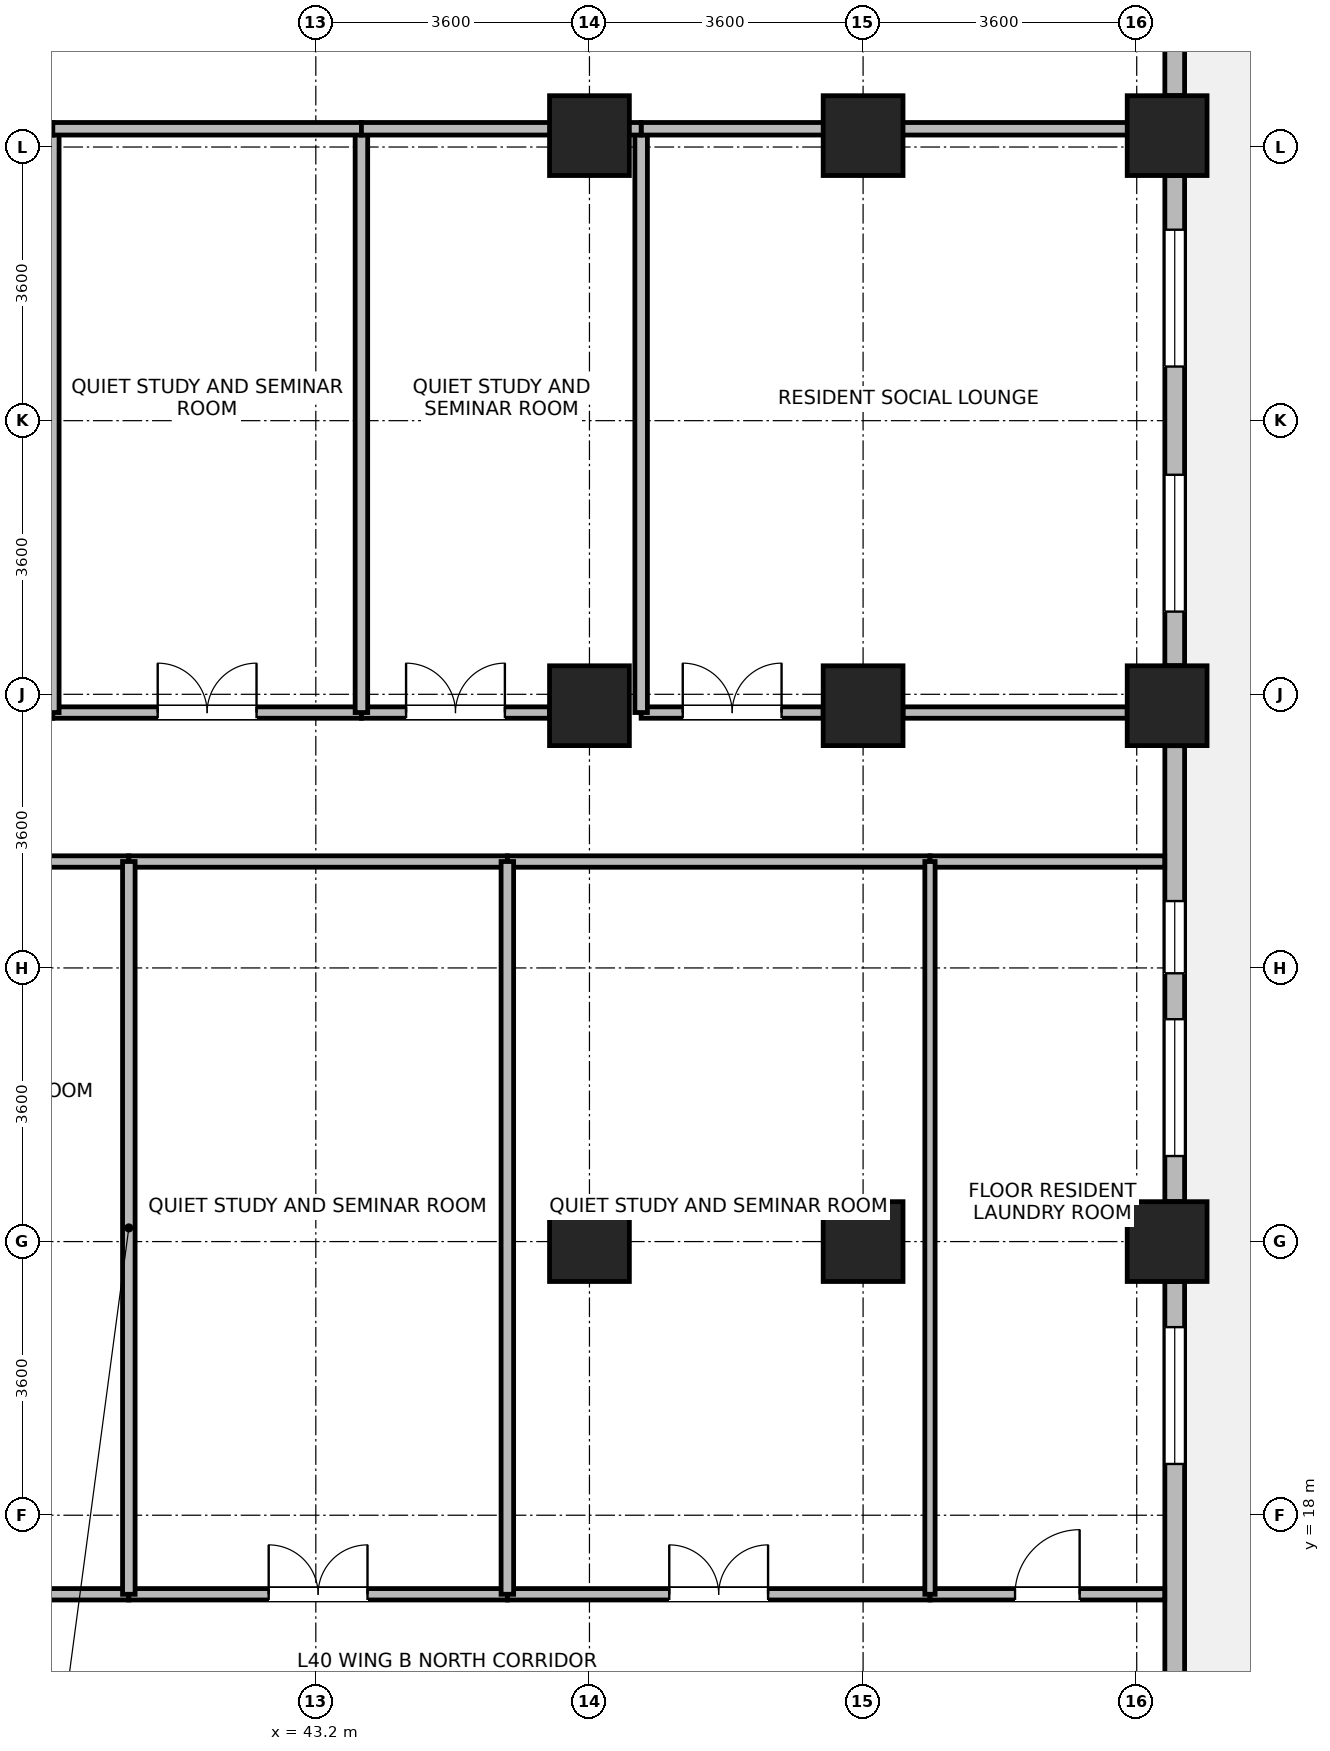
"""IFC4 building model, lengths in metres.
Left out: names, types, materials, properties, quantities, classifications, styles, units other than length and angle.
Written with IfcOpenShell. Run it as: python <this file> out.ifc"""

import sys

from ifc_helpers import new_model, si_unit, direction, frame, frame_2d, origin, origin_2d, place, context, subcontext, project, spatial, rectangle, extrude, source, transform, mapped, element, fill, save


model = new_model("IFC4")
c1 = context("Model", 3, precision=1e-05, world=origin(), true_north=direction((0.0, 1.0)))
c2 = subcontext(c1, "Body", "Model", "MODEL_VIEW")
j1 = project(units=[si_unit("LENGTHUNIT", "METRE"), si_unit("PLANEANGLEUNIT", "RADIAN")], contexts=[c1])
p1 = place(None, origin())
s1 = spatial("IfcSite", under=j1, at=p1, CompositionType="ELEMENT")
p2 = place(p1, origin())
s2 = spatial("IfcBuilding", under=s1, at=p2, CompositionType="ELEMENT")
p3 = place(p2, frame((0.0, 0.0, 158.7)))
s3 = spatial("IfcBuildingStorey", under=s2, at=p3, CompositionType="ELEMENT", Elevation=158.7)
m1 = source(origin(), c2, "Body", "SweptSolid", [
    extrude(rectangle(XDim=1.05, YDim=1.05, at=origin_2d()), origin(), (0.0, 0.0, 1.0), 3.7),
])
for number, where, z_axis, x_axis in (
    (1, (46.8, 21.6, 0.0), (0.0, 0.0, 1.0), (1.0, 0.0, 0.0)),
    (2, (46.8, 28.65, 0.0), (0.0, 0.0, 1.0), (1.0, 0.0, 0.0)),
    (3, (46.8, 36.15, 0.0), (0.0, 0.0, 1.0), (1.0, 0.0, 0.0)),
    (4, (50.4, 21.6, 0.0), (0.0, 0.0, 1.0), (1.0, 0.0, 0.0)),
    (5, (50.4, 28.65, 0.0), (0.0, 0.0, 1.0), (1.0, 0.0, 0.0)),
    (6, (50.4, 36.15, 0.0), (0.0, 0.0, 1.0), (1.0, 0.0, 0.0)),
    (7, (54.4, 21.6, 0.0), (0.0, 0.0, 1.0), (1.0, 0.0, 0.0)),
    (8, (54.4, 28.65, 0.0), (0.0, 0.0, 1.0), (1.0, 0.0, 0.0)),
    (9, (54.4, 36.15, 0.0), (0.0, 0.0, 1.0), (1.0, 0.0, 0.0)),
):
    element("IfcColumn", number, at=place(p3, frame(where, z_axis=z_axis, x_axis=x_axis)), inside=s3, PredefinedType="COLUMN", context=c2, shape_type="MappedRepresentation", body=[
        mapped(m1, transform((0.0, 0.0, 0.0), x_axis=(1.0, 0.0, 0.0), y_axis=(0.0, 1.0, 0.0), z_axis=(0.0, 0.0, 1.0), scale=1.0)),
    ])
p4 = place(p3, frame((54.5, 21.074, 0.0), z_axis=(0.0, 0.0, 1.0), x_axis=(0.0, -1.0, 0.0)))
e10 = element("IfcWall", 10, at=p4, inside=s3, PredefinedType="STANDARD", context=c2, shape_type="SweptSolid", body=[
    extrude(rectangle(XDim=5.998, YDim=0.26, at=frame_2d((2.999, 0.0))), origin(), (0.0, 0.0, 1.0), 2.99),
])
p5 = place(p4, frame((0.6, 0.0, 0.85)))
e11 = element("IfcOpeningElement", 11, at=p5, cuts=e10, PredefinedType="OPENING", context=c2, shape_type="SweptSolid", body=[
    extrude(rectangle(XDim=1.8, YDim=1.85, at=frame_2d((0.9, 0.925))), frame((0.0, 0.14, 0.0), z_axis=(0.0, -1.0, 0.0), x_axis=(1.0, 0.0, 0.0)), (0.0, 0.0, 1.0), 0.28),
])
p6 = place(p3, frame((54.5, 28.124, 0.0), z_axis=(0.0, 0.0, 1.0), x_axis=(0.0, -1.0, 0.0)))
e12 = element("IfcWall", 12, at=p6, inside=s3, PredefinedType="STANDARD", context=c2, shape_type="SweptSolid", body=[
    extrude(rectangle(XDim=5.998, YDim=0.26, at=frame_2d((2.999, 0.0))), origin(), (0.0, 0.0, 1.0), 2.99),
])
p7 = place(p6, frame((3.598, 0.0, 0.85)))
e13 = element("IfcOpeningElement", 13, at=p7, cuts=e12, PredefinedType="OPENING", context=c2, shape_type="SweptSolid", body=[
    extrude(rectangle(XDim=1.8, YDim=1.85, at=frame_2d((0.9, 0.925))), frame((0.0, 0.14, 0.0), z_axis=(0.0, -1.0, 0.0), x_axis=(1.0, 0.0, 0.0)), (0.0, 0.0, 1.0), 0.28),
])
p8 = place(p6, frame((2.044, 0.0, 0.85)))
e14 = element("IfcOpeningElement", 14, at=p8, cuts=e12, PredefinedType="OPENING", context=c2, shape_type="SweptSolid", body=[
    extrude(rectangle(XDim=0.95, YDim=1.75, at=frame_2d((0.475, 0.875))), frame((0.0, 0.14, 0.0), z_axis=(0.0, -1.0, 0.0), x_axis=(1.0, 0.0, 0.0)), (0.0, 0.0, 1.0), 0.28),
])
p9 = place(p3, frame((54.5, 35.624, 0.0), z_axis=(0.0, 0.0, 1.0), x_axis=(0.0, -1.0, 0.0)))
e15 = element("IfcWall", 15, at=p9, inside=s3, PredefinedType="STANDARD", context=c2, shape_type="SweptSolid", body=[
    extrude(rectangle(XDim=6.448, YDim=0.26, at=frame_2d((3.224, 0.0))), origin(), (0.0, 0.0, 1.0), 2.99),
])
p10 = place(p9, frame((0.712, 0.0, 0.85)))
e16 = element("IfcOpeningElement", 16, at=p10, cuts=e15, PredefinedType="OPENING", context=c2, shape_type="SweptSolid", body=[
    extrude(rectangle(XDim=1.8, YDim=1.85, at=frame_2d((0.9, 0.925))), frame((0.0, 0.14, 0.0), z_axis=(0.0, -1.0, 0.0), x_axis=(1.0, 0.0, 0.0)), (0.0, 0.0, 1.0), 0.28),
])
p11 = place(p9, frame((3.936, 0.0, 0.85)))
e17 = element("IfcOpeningElement", 17, at=p11, cuts=e15, PredefinedType="OPENING", context=c2, shape_type="SweptSolid", body=[
    extrude(rectangle(XDim=1.8, YDim=1.85, at=frame_2d((0.9, 0.925))), frame((0.0, 0.14, 0.0), z_axis=(0.0, -1.0, 0.0), x_axis=(1.0, 0.0, 0.0)), (0.0, 0.0, 1.0), 0.28),
])
p12 = place(p3, frame((54.5, 43.33, 0.0), z_axis=(0.0, 0.0, 1.0), x_axis=(0.0, -1.0, 0.0)))
e18 = element("IfcWall", 18, at=p12, inside=s3, PredefinedType="STANDARD", context=c2, shape_type="SweptSolid", body=[
    extrude(rectangle(XDim=6.654, YDim=0.26, at=frame_2d((3.327, 0.0))), origin(), (0.0, 0.0, 1.0), 3.44),
])
p13 = place(p12, frame((0.763, 0.0, 0.85)))
e19 = element("IfcOpeningElement", 19, at=p13, cuts=e18, PredefinedType="OPENING", context=c2, shape_type="SweptSolid", body=[
    extrude(rectangle(XDim=1.8, YDim=1.85, at=frame_2d((0.9, 0.925))), frame((0.0, 0.14, 0.0), z_axis=(0.0, -1.0, 0.0), x_axis=(1.0, 0.0, 0.0)), (0.0, 0.0, 1.0), 0.28),
])
p14 = place(p12, frame((4.091, 0.0, 0.85)))
e20 = element("IfcOpeningElement", 20, at=p14, cuts=e18, PredefinedType="OPENING", context=c2, shape_type="SweptSolid", body=[
    extrude(rectangle(XDim=1.8, YDim=1.85, at=frame_2d((0.9, 0.925))), frame((0.0, 0.14, 0.0), z_axis=(0.0, -1.0, 0.0), x_axis=(1.0, 0.0, 0.0)), (0.0, 0.0, 1.0), 0.28),
])
p15 = place(p3, frame((47.48, 28.56, 0.0), z_axis=(0.0, 0.0, 1.0), x_axis=(1.0, 0.0, 0.0)))
e21 = element("IfcWall", 21, at=p15, inside=s3, PredefinedType="PARTITIONING", context=c2, shape_type="SweptSolid", body=[
    extrude(rectangle(XDim=2.395, YDim=0.15, at=frame_2d((1.198, 0.0))), origin(), (0.0, 0.0, 1.0), 2.84),
])
p16 = place(p15, frame((0.548, 0.0, 0.0)))
e22 = element("IfcOpeningElement", 22, at=p16, cuts=e21, PredefinedType="OPENING", context=c2, shape_type="SweptSolid", body=[
    extrude(rectangle(XDim=1.3, YDim=2.12, at=frame_2d((0.65, 1.06))), frame((0.0, 0.085, 0.0), z_axis=(0.0, -1.0, 0.0), x_axis=(1.0, 0.0, 0.0)), (0.0, 0.0, 1.0), 0.17),
])
p17 = place(p3, frame((50.925, 28.56, 0.0), z_axis=(0.0, 0.0, 1.0), x_axis=(1.0, 0.0, 0.0)))
e23 = element("IfcWall", 23, at=p17, inside=s3, PredefinedType="PARTITIONING", context=c2, shape_type="SweptSolid", body=[
    extrude(rectangle(XDim=2.95, YDim=0.15, at=frame_2d((1.475, 0.0))), origin(), (0.0, 0.0, 1.0), 2.84),
])
p18 = place(p3, frame((45.72, 16.96, 0.0), z_axis=(0.0, 0.0, 1.0), x_axis=(1.0, 0.0, 0.0)))
e24 = element("IfcWall", 24, at=p18, inside=s3, PredefinedType="PARTITIONING", context=c2, shape_type="SweptSolid", body=[
    extrude(rectangle(XDim=5.56, YDim=0.15, at=frame_2d((2.78, 0.0))), origin(), (0.0, 0.0, 1.0), 3.44),
])
p19 = place(p18, frame((2.13, 0.0, 0.0)))
e25 = element("IfcOpeningElement", 25, at=p19, cuts=e24, PredefinedType="OPENING", context=c2, shape_type="SweptSolid", body=[
    extrude(rectangle(XDim=1.3, YDim=2.12, at=frame_2d((0.65, 1.06))), frame((0.0, 0.085, 0.0), z_axis=(0.0, -1.0, 0.0), x_axis=(1.0, 0.0, 0.0)), (0.0, 0.0, 1.0), 0.17),
])
p20 = place(p3, frame((45.72, 26.6, 0.0), z_axis=(0.0, 0.0, 1.0), x_axis=(1.0, 0.0, 0.0)))
e26 = element("IfcWall", 26, at=p20, inside=s3, PredefinedType="PARTITIONING", context=c2, shape_type="SweptSolid", body=[
    extrude(rectangle(XDim=5.56, YDim=0.15, at=frame_2d((2.78, 0.0))), origin(), (0.0, 0.0, 1.0), 3.44),
])
for number, where, z_axis, x_axis in (
    (27, (35.36, 16.96, 0.0), (0.0, 0.0, 1.0), (1.0, 0.0, 0.0)),
    (28, (35.36, 26.6, 0.0), (0.0, 0.0, 1.0), (1.0, 0.0, 0.0)),
):
    element("IfcWall", number, at=place(p3, frame(where, z_axis=z_axis, x_axis=x_axis)), inside=s3, PredefinedType="PARTITIONING", context=c2, shape_type="SweptSolid", body=[
        extrude(rectangle(XDim=5.38, YDim=0.15, at=frame_2d((2.69, 0.0))), origin(), (0.0, 0.0, 1.0), 3.44),
    ])
p21 = place(p3, frame((40.74, 16.96, 0.0), z_axis=(0.0, 0.0, 1.0), x_axis=(1.0, 0.0, 0.0)))
e29 = element("IfcWall", 29, at=p21, inside=s3, PredefinedType="PARTITIONING", context=c2, shape_type="SweptSolid", body=[
    extrude(rectangle(XDim=4.98, YDim=0.15, at=frame_2d((2.49, 0.0))), origin(), (0.0, 0.0, 1.0), 3.44),
])
p22 = place(p21, frame((1.84, 0.0, 0.0)))
e30 = element("IfcOpeningElement", 30, at=p22, cuts=e29, PredefinedType="OPENING", context=c2, shape_type="SweptSolid", body=[
    extrude(rectangle(XDim=1.3, YDim=2.12, at=frame_2d((0.65, 1.06))), frame((0.0, 0.085, 0.0), z_axis=(0.0, -1.0, 0.0), x_axis=(1.0, 0.0, 0.0)), (0.0, 0.0, 1.0), 0.17),
])
p23 = place(p3, frame((40.74, 26.6, 0.0), z_axis=(0.0, 0.0, 1.0), x_axis=(1.0, 0.0, 0.0)))
e31 = element("IfcWall", 31, at=p23, inside=s3, PredefinedType="PARTITIONING", context=c2, shape_type="SweptSolid", body=[
    extrude(rectangle(XDim=4.98, YDim=0.15, at=frame_2d((2.49, 0.0))), origin(), (0.0, 0.0, 1.0), 3.44),
])
p24 = place(p3, frame((36.525, 28.56, 0.0), z_axis=(0.0, 0.0, 1.0), x_axis=(1.0, 0.0, 0.0)))
e32 = element("IfcWall", 32, at=p24, inside=s3, PredefinedType="PARTITIONING", context=c2, shape_type="SweptSolid", body=[
    extrude(rectangle(XDim=3.215, YDim=0.15, at=frame_2d((1.607, 0.0))), origin(), (0.0, 0.0, 1.0), 2.84),
])
p25 = place(p3, frame((39.74, 28.56, 0.0), z_axis=(0.0, 0.0, 1.0), x_axis=(1.0, 0.0, 0.0)))
e33 = element("IfcWall", 33, at=p25, inside=s3, PredefinedType="PARTITIONING", context=c2, shape_type="SweptSolid", body=[
    extrude(rectangle(XDim=4.06, YDim=0.15, at=frame_2d((2.03, 0.0))), origin(), (0.0, 0.0, 1.0), 2.84),
])
p26 = place(p25, frame((1.38, 0.0, 0.0)))
e34 = element("IfcOpeningElement", 34, at=p26, cuts=e33, PredefinedType="OPENING", context=c2, shape_type="SweptSolid", body=[
    extrude(rectangle(XDim=1.3, YDim=2.12, at=frame_2d((0.65, 1.06))), frame((0.0, 0.085, 0.0), z_axis=(0.0, -1.0, 0.0), x_axis=(1.0, 0.0, 0.0)), (0.0, 0.0, 1.0), 0.17),
])
p27 = place(p3, frame((43.8, 28.56, 0.0), z_axis=(0.0, 0.0, 1.0), x_axis=(1.0, 0.0, 0.0)))
e35 = element("IfcWall", 35, at=p27, inside=s3, PredefinedType="PARTITIONING", context=c2, shape_type="SweptSolid", body=[
    extrude(rectangle(XDim=2.475, YDim=0.15, at=frame_2d((1.237, 0.0))), origin(), (0.0, 0.0, 1.0), 2.84),
])
p28 = place(p27, frame((0.587, 0.0, 0.0)))
e36 = element("IfcOpeningElement", 36, at=p28, cuts=e35, PredefinedType="OPENING", context=c2, shape_type="SweptSolid", body=[
    extrude(rectangle(XDim=1.3, YDim=2.12, at=frame_2d((0.65, 1.06))), frame((0.0, 0.085, 0.0), z_axis=(0.0, -1.0, 0.0), x_axis=(1.0, 0.0, 0.0)), (0.0, 0.0, 1.0), 0.17),
])
p29 = place(p3, frame((51.28, 16.96, 0.0), z_axis=(0.0, 0.0, 1.0), x_axis=(1.0, 0.0, 0.0)))
e37 = element("IfcWall", 37, at=p29, inside=s3, PredefinedType="PARTITIONING", context=c2, shape_type="SweptSolid", body=[
    extrude(rectangle(XDim=3.088, YDim=0.15, at=frame_2d((1.544, 0.0))), origin(), (0.0, 0.0, 1.0), 3.44),
])
p30 = place(p29, frame((1.119, 0.0, 0.0)))
e38 = element("IfcOpeningElement", 38, at=p30, cuts=e37, PredefinedType="OPENING", context=c2, shape_type="SweptSolid", body=[
    extrude(rectangle(XDim=0.85, YDim=2.04, at=frame_2d((0.425, 1.02))), frame((0.0, 0.085, 0.0), z_axis=(0.0, -1.0, 0.0), x_axis=(1.0, 0.0, 0.0)), (0.0, 0.0, 1.0), 0.17),
])
p31 = place(p3, frame((51.28, 26.6, 0.0), z_axis=(0.0, 0.0, 1.0), x_axis=(1.0, 0.0, 0.0)))
e39 = element("IfcWall", 39, at=p31, inside=s3, PredefinedType="PARTITIONING", context=c2, shape_type="SweptSolid", body=[
    extrude(rectangle(XDim=3.088, YDim=0.15, at=frame_2d((1.544, 0.0))), origin(), (0.0, 0.0, 1.0), 3.44),
])
for number, where, z_axis, x_axis in (
    (40, (40.74, 16.96, 0.0), (0.0, 0.0, 1.0), (0.0, 1.0, 0.0)),
    (41, (45.72, 16.96, 0.0), (0.0, 0.0, 1.0), (0.0, 1.0, 0.0)),
):
    element("IfcWall", number, at=place(p3, frame(where, z_axis=z_axis, x_axis=x_axis)), inside=s3, PredefinedType="PARTITIONING", context=c2, shape_type="SweptSolid", body=[
        extrude(rectangle(XDim=9.64, YDim=0.165, at=frame_2d((4.82, 0.0))), origin(), (0.0, 0.0, 1.0), 3.44),
    ])
p32 = place(p3, frame((51.28, 16.96, 0.0), z_axis=(0.0, 0.0, 1.0), x_axis=(0.0, 1.0, 0.0)))
e42 = element("IfcWall", 42, at=p32, inside=s3, PredefinedType="PARTITIONING", context=c2, shape_type="SweptSolid", body=[
    extrude(rectangle(XDim=9.64, YDim=0.135, at=frame_2d((4.82, 0.0))), origin(), (0.0, 0.0, 1.0), 3.44),
])
for number, where, z_axis, x_axis in (
    (43, (39.74, 28.56, 0.0), (0.0, 0.0, 1.0), (0.0, 1.0, 0.0)),
    (44, (43.8, 28.56, 0.0), (0.0, 0.0, 1.0), (0.0, 1.0, 0.0)),
    (45, (47.48, 28.56, 0.0), (0.0, 0.0, 1.0), (0.0, 1.0, 0.0)),
):
    element("IfcWall", number, at=place(p3, frame(where, z_axis=z_axis, x_axis=x_axis)), inside=s3, PredefinedType="PARTITIONING", context=c2, shape_type="SweptSolid", body=[
        extrude(rectangle(XDim=7.68, YDim=0.165, at=frame_2d((3.84, 0.0))), origin(), (0.0, 0.0, 1.0), 3.44),
    ])
p33 = place(p3, frame((47.48, 36.24, 0.0), z_axis=(0.0, 0.0, 1.0), x_axis=(1.0, 0.0, 0.0)))
e46 = element("IfcWall", 46, at=p33, inside=s3, PredefinedType="PARTITIONING", context=c2, shape_type="SweptSolid", body=[
    extrude(rectangle(XDim=6.888, YDim=0.165, at=frame_2d((3.444, 0.0))), origin(), (0.0, 0.0, 1.0), 2.84),
])
p34 = place(p3, frame((35.36, 36.24, 0.0), z_axis=(0.0, 0.0, 1.0), x_axis=(1.0, 0.0, 0.0)))
e47 = element("IfcWall", 47, at=p34, inside=s3, PredefinedType="PARTITIONING", context=c2, shape_type="SweptSolid", body=[
    extrude(rectangle(XDim=4.38, YDim=0.165, at=frame_2d((2.19, 0.0))), origin(), (0.0, 0.0, 1.0), 2.84),
])
p35 = place(p3, frame((39.74, 36.24, 0.0), z_axis=(0.0, 0.0, 1.0), x_axis=(1.0, 0.0, 0.0)))
e48 = element("IfcWall", 48, at=p35, inside=s3, PredefinedType="PARTITIONING", context=c2, shape_type="SweptSolid", body=[
    extrude(rectangle(XDim=4.06, YDim=0.165, at=frame_2d((2.03, 0.0))), origin(), (0.0, 0.0, 1.0), 2.84),
])
p36 = place(p3, frame((43.8, 36.24, 0.0), z_axis=(0.0, 0.0, 1.0), x_axis=(1.0, 0.0, 0.0)))
e49 = element("IfcWall", 49, at=p36, inside=s3, PredefinedType="PARTITIONING", context=c2, shape_type="SweptSolid", body=[
    extrude(rectangle(XDim=3.68, YDim=0.165, at=frame_2d((1.84, 0.0))), origin(), (0.0, 0.0, 1.0), 2.84),
])
p37 = place(p5, origin())
e50 = element("IfcWindow", 50, at=p37, inside=s3, PartitioningType="SINGLE_PANEL", PredefinedType="WINDOW", context=c2, shape_type="SweptSolid", body=[
    extrude(rectangle(XDim=1.8, YDim=1.85, at=frame_2d((0.9, 0.925))), frame((0.0, 0.03, 0.0), z_axis=(0.0, -1.0, 0.0), x_axis=(1.0, 0.0, 0.0)), (0.0, 0.0, 1.0), 0.06),
])
fill(e11, e50)
p38 = place(p7, origin())
e51 = element("IfcWindow", 51, at=p38, inside=s3, PartitioningType="SINGLE_PANEL", PredefinedType="WINDOW", context=c2, shape_type="SweptSolid", body=[
    extrude(rectangle(XDim=1.8, YDim=1.85, at=frame_2d((0.9, 0.925))), frame((0.0, 0.03, 0.0), z_axis=(0.0, -1.0, 0.0), x_axis=(1.0, 0.0, 0.0)), (0.0, 0.0, 1.0), 0.06),
])
fill(e13, e51)
p39 = place(p8, origin())
e52 = element("IfcWindow", 52, at=p39, inside=s3, PartitioningType="SINGLE_PANEL", PredefinedType="WINDOW", context=c2, shape_type="SweptSolid", body=[
    extrude(rectangle(XDim=0.95, YDim=1.75, at=frame_2d((0.475, 0.875))), frame((0.0, 0.03, 0.0), z_axis=(0.0, -1.0, 0.0), x_axis=(1.0, 0.0, 0.0)), (0.0, 0.0, 1.0), 0.06),
])
fill(e14, e52)
p40 = place(p10, origin())
e53 = element("IfcWindow", 53, at=p40, inside=s3, PartitioningType="SINGLE_PANEL", PredefinedType="WINDOW", context=c2, shape_type="SweptSolid", body=[
    extrude(rectangle(XDim=1.8, YDim=1.85, at=frame_2d((0.9, 0.925))), frame((0.0, 0.03, 0.0), z_axis=(0.0, -1.0, 0.0), x_axis=(1.0, 0.0, 0.0)), (0.0, 0.0, 1.0), 0.06),
])
fill(e16, e53)
p41 = place(p11, origin())
e54 = element("IfcWindow", 54, at=p41, inside=s3, PartitioningType="SINGLE_PANEL", PredefinedType="WINDOW", context=c2, shape_type="SweptSolid", body=[
    extrude(rectangle(XDim=1.8, YDim=1.85, at=frame_2d((0.9, 0.925))), frame((0.0, 0.03, 0.0), z_axis=(0.0, -1.0, 0.0), x_axis=(1.0, 0.0, 0.0)), (0.0, 0.0, 1.0), 0.06),
])
fill(e17, e54)
p42 = place(p16, origin())
e55 = element("IfcDoor", 55, at=p42, inside=s3, OperationType="DOUBLE_DOOR_SINGLE_SWING", PredefinedType="DOOR", context=c2, shape_type="SweptSolid", body=[
    extrude(rectangle(XDim=1.3, YDim=2.12, at=frame_2d((0.65, 1.06))), frame((0.0, 0.025, 0.0), z_axis=(0.0, -1.0, 0.0), x_axis=(1.0, 0.0, 0.0)), (0.0, 0.0, 1.0), 0.05),
])
fill(e22, e55)
p43 = place(p19, origin())
e56 = element("IfcDoor", 56, at=p43, inside=s3, OperationType="DOUBLE_DOOR_SINGLE_SWING", PredefinedType="DOOR", context=c2, shape_type="SweptSolid", body=[
    extrude(rectangle(XDim=1.3, YDim=2.12, at=frame_2d((0.65, 1.06))), frame((0.0, 0.025, 0.0), z_axis=(0.0, -1.0, 0.0), x_axis=(1.0, 0.0, 0.0)), (0.0, 0.0, 1.0), 0.05),
])
fill(e25, e56)
p44 = place(p22, origin())
e57 = element("IfcDoor", 57, at=p44, inside=s3, OperationType="DOUBLE_DOOR_SINGLE_SWING", PredefinedType="DOOR", context=c2, shape_type="SweptSolid", body=[
    extrude(rectangle(XDim=1.3, YDim=2.12, at=frame_2d((0.65, 1.06))), frame((0.0, 0.025, 0.0), z_axis=(0.0, -1.0, 0.0), x_axis=(1.0, 0.0, 0.0)), (0.0, 0.0, 1.0), 0.05),
])
fill(e30, e57)
p45 = place(p26, origin())
e58 = element("IfcDoor", 58, at=p45, inside=s3, OperationType="DOUBLE_DOOR_SINGLE_SWING", PredefinedType="DOOR", context=c2, shape_type="SweptSolid", body=[
    extrude(rectangle(XDim=1.3, YDim=2.12, at=frame_2d((0.65, 1.06))), frame((0.0, 0.025, 0.0), z_axis=(0.0, -1.0, 0.0), x_axis=(1.0, 0.0, 0.0)), (0.0, 0.0, 1.0), 0.05),
])
fill(e34, e58)
p46 = place(p28, origin())
e59 = element("IfcDoor", 59, at=p46, inside=s3, OperationType="DOUBLE_DOOR_SINGLE_SWING", PredefinedType="DOOR", context=c2, shape_type="SweptSolid", body=[
    extrude(rectangle(XDim=1.3, YDim=2.12, at=frame_2d((0.65, 1.06))), frame((0.0, 0.025, 0.0), z_axis=(0.0, -1.0, 0.0), x_axis=(1.0, 0.0, 0.0)), (0.0, 0.0, 1.0), 0.05),
])
fill(e36, e59)
p47 = place(p30, origin())
e60 = element("IfcDoor", 60, at=p47, inside=s3, OperationType="SINGLE_SWING_RIGHT", PredefinedType="DOOR", context=c2, shape_type="SweptSolid", body=[
    extrude(rectangle(XDim=0.85, YDim=2.04, at=frame_2d((0.425, 1.02))), frame((0.0, 0.025, 0.0), z_axis=(0.0, -1.0, 0.0), x_axis=(1.0, 0.0, 0.0)), (0.0, 0.0, 1.0), 0.05),
])
fill(e38, e60)
save(model, sys.argv[1])
